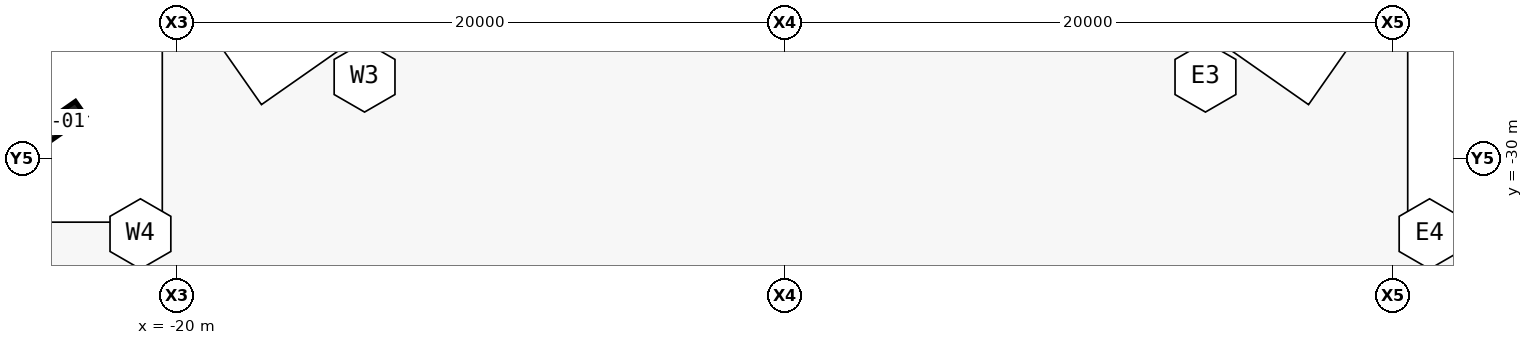
"""IFC4 building model, lengths in metres.
Left out: names, types, materials, properties, quantities, classifications, styles, units other than length and angle.
Written with IfcOpenShell. Run it as: python <this file> out.ifc"""

import sys

from ifc_helpers import new_model, si_unit, direction, frame, origin, origin_2d, place, context, subcontext, project, spatial, rectangle, extrude, element, save


model = new_model("IFC4")
c1 = context("Model", 3, precision=1e-05, world=origin(), true_north=direction((0.0, 1.0)))
c2 = subcontext(c1, "Body", "Model", "MODEL_VIEW")
j1 = project(units=[si_unit("LENGTHUNIT", "METRE"), si_unit("PLANEANGLEUNIT", "RADIAN")], contexts=[c1])
p1 = place(None, origin())
s1 = spatial("IfcSite", under=j1, at=p1, CompositionType="ELEMENT")
p2 = place(p1, origin())
s2 = spatial("IfcBuilding", under=s1, at=p2, CompositionType="ELEMENT")
p3 = place(p2, frame((0.0, 0.0, -9.0)))
s3 = spatial("IfcBuildingStorey", under=s2, at=p3, CompositionType="ELEMENT", Elevation=-9.0)
p4 = place(p3, frame((-23.782, -28.799, 0.0), z_axis=(0.0, 0.0, 1.0), x_axis=(-0.819152044289, -0.573576436351, 0.0)))
e1 = element("IfcColumn", 1, at=p4, inside=s3, PredefinedType="COLUMN", context=c2, shape_type="SweptSolid", body=[
    extrude(rectangle(XDim=1.5, YDim=0.6, at=origin_2d()), origin(), (0.0, 0.0, 1.0), 4.5),
])
save(model, sys.argv[1])
